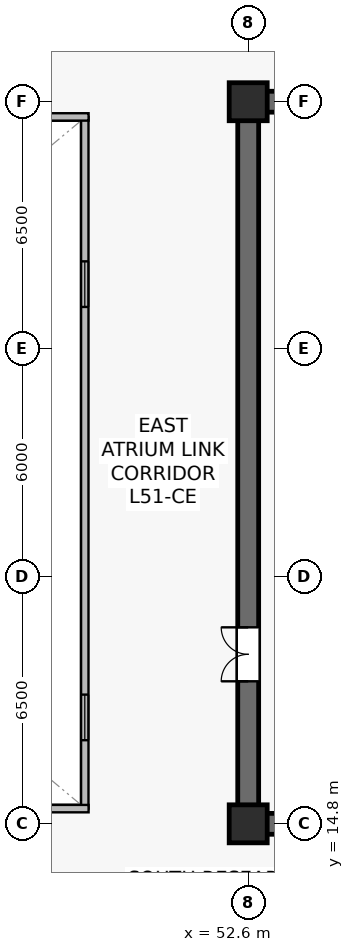
"""IFC4 building model, lengths in metres.
Left out: names, types, materials, properties, quantities, classifications, styles, units other than length and angle.
Written with IfcOpenShell. Run it as: python <this file> out.ifc"""

import sys

from ifc_helpers import new_model, si_unit, direction, frame, frame_2d, origin, origin_2d, place, context, subcontext, project, spatial, rectangle, extrude, source, transform, mapped, element, fill, save


model = new_model("IFC4")
c1 = context("Model", 3, precision=1e-05, world=origin(), true_north=direction((0.0, 1.0)))
c2 = subcontext(c1, "Body", "Model", "MODEL_VIEW")
j1 = project(units=[si_unit("LENGTHUNIT", "METRE"), si_unit("PLANEANGLEUNIT", "RADIAN")], contexts=[c1])
p1 = place(None, origin())
s1 = spatial("IfcSite", under=j1, at=p1, CompositionType="ELEMENT")
p2 = place(p1, origin())
s2 = spatial("IfcBuilding", under=s1, at=p2, CompositionType="ELEMENT")
p3 = place(p2, frame((0.0, 0.0, 213.7)))
s3 = spatial("IfcBuildingStorey", under=s2, at=p3, CompositionType="ELEMENT", Elevation=213.7)
p4 = place(p3, frame((52.325, 14.8, 0.0), z_axis=(0.0, 0.0, 1.0), x_axis=(1.0, 0.0, 0.0)))
e1 = element("IfcWall", 1, at=p4, inside=s3, PredefinedType="SHEAR", context=c2, shape_type="SweptSolid", body=[
    extrude(rectangle(XDim=15.35, YDim=0.55, at=frame_2d((7.675, 0.0))), origin(), (0.0, 0.0, 1.0), 3.8),
])
p5 = place(p3, frame((52.325, 33.8, 0.0), z_axis=(0.0, 0.0, 1.0), x_axis=(1.0, 0.0, 0.0)))
e2 = element("IfcWall", 2, at=p5, inside=s3, PredefinedType="SHEAR", context=c2, shape_type="SweptSolid", body=[
    extrude(rectangle(XDim=15.35, YDim=0.55, at=frame_2d((7.675, 0.0))), origin(), (0.0, 0.0, 1.0), 3.8),
])
p6 = place(p5, frame((6.075, 0.0, 0.0)))
e3 = element("IfcOpeningElement", 3, at=p6, cuts=e2, PredefinedType="OPENING", context=c2, shape_type="SweptSolid", body=[
    extrude(rectangle(XDim=0.95, YDim=2.15, at=frame_2d((0.475, 1.075))), frame((0.0, 0.285, 0.0), z_axis=(0.0, -1.0, 0.0), x_axis=(1.0, 0.0, 0.0)), (0.0, 0.0, 1.0), 0.57),
])
p7 = place(p5, frame((2.535, 0.0, 0.0)))
e4 = element("IfcOpeningElement", 4, at=p7, cuts=e2, PredefinedType="OPENING", context=c2, shape_type="SweptSolid", body=[
    extrude(rectangle(XDim=0.95, YDim=2.15, at=frame_2d((0.475, 1.075))), frame((0.0, 0.285, 0.0), z_axis=(0.0, -1.0, 0.0), x_axis=(1.0, 0.0, 0.0)), (0.0, 0.0, 1.0), 0.57),
])
p8 = place(p3, frame((52.6, 15.075, 0.0), z_axis=(0.0, 0.0, 1.0), x_axis=(0.0, 1.0, 0.0)))
e5 = element("IfcWall", 5, at=p8, inside=s3, PredefinedType="SHEAR", context=c2, shape_type="SweptSolid", body=[
    extrude(rectangle(XDim=18.45, YDim=0.55, at=frame_2d((9.225, 0.0))), origin(), (0.0, 0.0, 1.0), 3.8),
])
p9 = place(p8, frame((3.475, 0.0, 0.0)))
e6 = element("IfcOpeningElement", 6, at=p9, cuts=e5, PredefinedType="OPENING", context=c2, shape_type="SweptSolid", body=[
    extrude(rectangle(XDim=1.42, YDim=2.2, at=frame_2d((0.71, 1.1))), frame((0.0, 0.285, 0.0), z_axis=(0.0, -1.0, 0.0), x_axis=(1.0, 0.0, 0.0)), (0.0, 0.0, 1.0), 0.57),
])
m1 = source(origin(), c2, "Body", "SweptSolid", [
    extrude(rectangle(XDim=1.0, YDim=1.0, at=origin_2d()), origin(), (0.0, 0.0, 1.0), 4.1),
])
for number, where, z_axis, x_axis in (
    (7, (52.6, 14.8, 0.0), (0.0, 0.0, 1.0), (1.0, 0.0, 0.0)),
    (8, (52.6, 33.8, 0.0), (0.0, 0.0, 1.0), (1.0, 0.0, 0.0)),
):
    element("IfcColumn", number, at=place(p3, frame(where, z_axis=z_axis, x_axis=x_axis)), inside=s3, PredefinedType="COLUMN", context=c2, shape_type="MappedRepresentation", body=[
        mapped(m1, transform((0.0, 0.0, 0.0), scale=1.0)),
    ])
p10 = place(p3, frame((48.3, 15.2, 0.0), z_axis=(0.0, 0.0, 1.0), x_axis=(0.0, 1.0, 0.0)))
e9 = element("IfcWall", 9, at=p10, inside=s3, PredefinedType="SOLIDWALL", context=c2, shape_type="SweptSolid", body=[
    extrude(rectangle(XDim=18.2, YDim=0.195, at=frame_2d((9.1, 0.0))), origin(), (0.0, 0.0, 1.0), 3.8),
])
p11 = place(p10, frame((1.8, 0.0, 0.9)))
e10 = element("IfcOpeningElement", 10, at=p11, cuts=e9, PredefinedType="OPENING", context=c2, shape_type="SweptSolid", body=[
    extrude(rectangle(XDim=1.2, YDim=1.35, at=frame_2d((0.6, 0.675))), frame((0.0, 0.107, 0.0), z_axis=(0.0, -1.0, 0.0), x_axis=(1.0, 0.0, 0.0)), (0.0, 0.0, 1.0), 0.215),
])
p12 = place(p10, frame((13.2, 0.0, 0.9)))
e11 = element("IfcOpeningElement", 11, at=p12, cuts=e9, PredefinedType="OPENING", context=c2, shape_type="SweptSolid", body=[
    extrude(rectangle(XDim=1.2, YDim=1.35, at=frame_2d((0.6, 0.675))), frame((0.0, 0.107, 0.0), z_axis=(0.0, -1.0, 0.0), x_axis=(1.0, 0.0, 0.0)), (0.0, 0.0, 1.0), 0.215),
])
for number, where, z_axis, x_axis in (
    (12, (26.4, 15.2, 0.0), (0.0, 0.0, 1.0), (1.0, 0.0, 0.0)),
    (13, (26.4, 33.4, 0.0), (0.0, 0.0, 1.0), (1.0, 0.0, 0.0)),
):
    element("IfcWall", number, at=place(p3, frame(where, z_axis=z_axis, x_axis=x_axis)), inside=s3, PredefinedType="SOLIDWALL", context=c2, shape_type="SweptSolid", body=[
        extrude(rectangle(XDim=22.0, YDim=0.195, at=frame_2d((11.0, 0.0))), origin(), (0.0, 0.0, 1.0), 3.8),
    ])
m2 = source(origin(), c2, "Body", "SweptSolid", [
    extrude(rectangle(XDim=1.2, YDim=1.35, at=frame_2d((0.6, 0.675))), frame((0.0, 0.03, 0.0), z_axis=(0.0, -1.0, 0.0), x_axis=(1.0, 0.0, 0.0)), (0.0, 0.0, 1.0), 0.06),
])
p13 = place(p11, origin())
e14 = element("IfcWindow", 14, at=p13, inside=s3, PartitioningType="SINGLE_PANEL", PredefinedType="WINDOW", context=c2, shape_type="MappedRepresentation", body=[
    mapped(m2, transform((0.0, 0.0, 0.0), scale=1.0)),
])
fill(e10, e14)
p14 = place(p12, origin())
e15 = element("IfcWindow", 15, at=p14, inside=s3, PartitioningType="SINGLE_PANEL", PredefinedType="WINDOW", context=c2, shape_type="MappedRepresentation", body=[
    mapped(m2, transform((0.0, 0.0, 0.0), scale=1.0)),
])
fill(e11, e15)
m3 = source(origin(), c2, "Body", "SweptSolid", [
    extrude(rectangle(XDim=1.42, YDim=2.2, at=frame_2d((0.71, 1.1))), frame((0.0, 0.025, 0.0), z_axis=(0.0, -1.0, 0.0), x_axis=(1.0, 0.0, 0.0)), (0.0, 0.0, 1.0), 0.05),
])
p15 = place(p9, origin())
e16 = element("IfcDoor", 16, at=p15, inside=s3, OperationType="DOUBLE_DOOR_SINGLE_SWING", PredefinedType="DOOR", context=c2, shape_type="MappedRepresentation", body=[
    mapped(m3, transform((0.0, 0.0, 0.0), scale=1.0)),
])
fill(e6, e16)
save(model, sys.argv[1])
